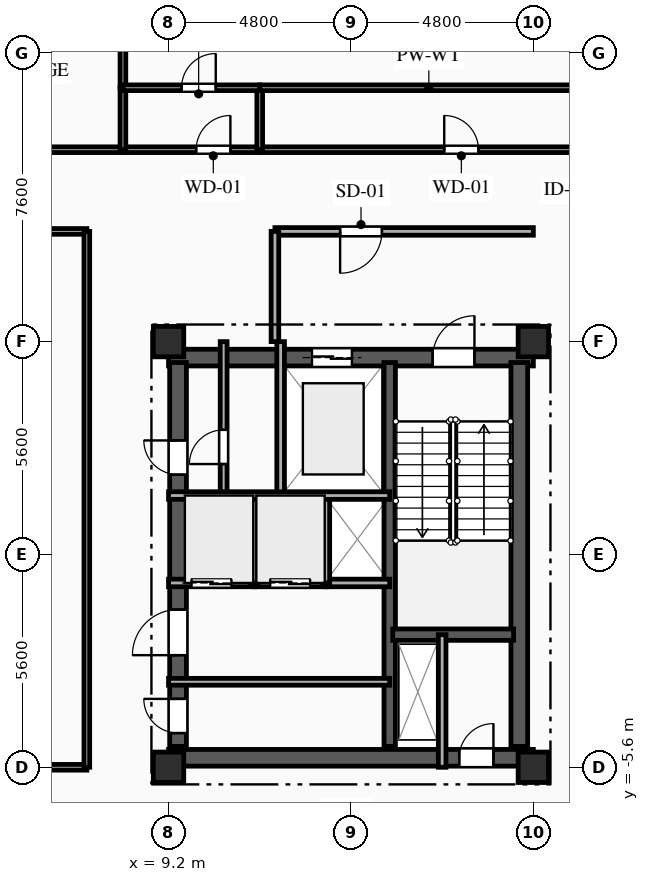
"""IFC4 building model, lengths in metres.
Left out: names, types, materials, properties, quantities, classifications, styles, units other than length and angle.
Written with IfcOpenShell. Run it as: python <this file> out.ifc"""

import sys

from ifc_helpers import new_model, si_unit, direction, frame, frame_2d, origin, origin_2d, place, context, subcontext, project, spatial, rectangle, extrude, element, fill, save


model = new_model("IFC4")
c1 = context("Model", 3, precision=1e-05, world=origin(), true_north=direction((0.0, 1.0)))
c2 = subcontext(c1, "Body", "Model", "MODEL_VIEW")
j1 = project(units=[si_unit("LENGTHUNIT", "METRE"), si_unit("PLANEANGLEUNIT", "RADIAN")], contexts=[c1])
p1 = place(None, origin())
s1 = spatial("IfcSite", under=j1, at=p1, CompositionType="ELEMENT")
p2 = place(p1, origin())
s2 = spatial("IfcBuilding", under=s1, at=p2, CompositionType="ELEMENT")
p3 = place(p2, frame((0.0, 0.0, 261.8)))
s3 = spatial("IfcBuildingStorey", under=s2, at=p3, CompositionType="ELEMENT", Elevation=261.8)
for number, where, z_axis, x_axis in (
    (1, (9.2, -5.6, 0.0), (0.0, 0.0, 1.0), (1.0, 0.0, 0.0)),
    (2, (9.2, 5.6, 0.0), (0.0, 0.0, 1.0), (1.0, 0.0, 0.0)),
    (3, (18.8, -5.6, 0.0), (0.0, 0.0, 1.0), (1.0, 0.0, 0.0)),
    (4, (18.8, 5.6, 0.0), (0.0, 0.0, 1.0), (1.0, 0.0, 0.0)),
):
    element("IfcColumn", number, at=place(p3, frame(where, z_axis=z_axis, x_axis=x_axis)), inside=s3, PredefinedType="COLUMN", context=c2, shape_type="SweptSolid", body=[
        extrude(rectangle(XDim=0.8, YDim=0.8, at=origin_2d()), origin(), (0.0, 0.0, 1.0), 4.2),
    ])
p4 = place(p3, frame((9.2, 5.18, 0.0), z_axis=(0.0, 0.0, 1.0), x_axis=(1.0, 0.0, 0.0)))
e5 = element("IfcWall", 5, at=p4, inside=s3, PredefinedType="SHEAR", context=c2, shape_type="SweptSolid", body=[
    extrude(rectangle(XDim=9.6, YDim=0.44, at=frame_2d((4.8, 0.0))), origin(), (0.0, 0.0, 1.0), 3.78),
])
p5 = place(p4, frame((6.95, 0.0, 0.0)))
e6 = element("IfcOpeningElement", 6, at=p5, cuts=e5, PredefinedType="OPENING", context=c2, shape_type="SweptSolid", body=[
    extrude(rectangle(XDim=1.1, YDim=2.15, at=frame_2d((0.55, 1.075))), frame((0.0, 0.23, 0.0), z_axis=(0.0, -1.0, 0.0), x_axis=(1.0, 0.0, 0.0)), (0.0, 0.0, 1.0), 0.46),
])
p6 = place(p4, frame((3.775, 0.0, 0.0)))
e7 = element("IfcOpeningElement", 7, at=p6, cuts=e5, PredefinedType="OPENING", context=c2, shape_type="SweptSolid", body=[
    extrude(rectangle(XDim=1.05, YDim=2.1, at=frame_2d((0.525, 1.05))), frame((0.0, 0.23, 0.0), z_axis=(0.0, -1.0, 0.0), x_axis=(1.0, 0.0, 0.0)), (0.0, 0.0, 1.0), 0.46),
])
p7 = place(p3, frame((9.2, -5.35, 0.0), z_axis=(0.0, 0.0, 1.0), x_axis=(1.0, 0.0, 0.0)))
e8 = element("IfcWall", 8, at=p7, inside=s3, PredefinedType="SHEAR", context=c2, shape_type="SweptSolid", body=[
    extrude(rectangle(XDim=9.6, YDim=0.44, at=frame_2d((4.8, 0.0))), origin(), (0.0, 0.0, 1.0), 3.78),
])
p8 = place(p7, frame((7.65, 0.0, 0.0)))
e9 = element("IfcOpeningElement", 9, at=p8, cuts=e8, PredefinedType="OPENING", context=c2, shape_type="SweptSolid", body=[
    extrude(rectangle(XDim=0.9, YDim=2.1, at=frame_2d((0.45, 1.05))), frame((0.0, 0.23, 0.0), z_axis=(0.0, -1.0, 0.0), x_axis=(1.0, 0.0, 0.0)), (0.0, 0.0, 1.0), 0.46),
])
p9 = place(p3, frame((9.45, -5.05, 0.0), z_axis=(0.0, 0.0, 1.0), x_axis=(0.0, 1.0, 0.0)))
e10 = element("IfcWall", 10, at=p9, inside=s3, PredefinedType="SHEAR", context=c2, shape_type="SweptSolid", body=[
    extrude(rectangle(XDim=10.1, YDim=0.44, at=frame_2d((5.05, 0.0))), origin(), (0.0, 0.0, 1.0), 3.78),
])
p10 = place(p9, frame((7.15, 0.0, 0.0)))
e11 = element("IfcOpeningElement", 11, at=p10, cuts=e10, PredefinedType="OPENING", context=c2, shape_type="SweptSolid", body=[
    extrude(rectangle(XDim=0.9, YDim=2.1, at=frame_2d((0.45, 1.05))), frame((0.0, 0.23, 0.0), z_axis=(0.0, -1.0, 0.0), x_axis=(1.0, 0.0, 0.0)), (0.0, 0.0, 1.0), 0.46),
])
p11 = place(p9, frame((2.4, 0.0, 0.0)))
e12 = element("IfcOpeningElement", 12, at=p11, cuts=e10, PredefinedType="OPENING", context=c2, shape_type="SweptSolid", body=[
    extrude(rectangle(XDim=1.2, YDim=2.15, at=frame_2d((0.6, 1.075))), frame((0.0, 0.23, 0.0), z_axis=(0.0, -1.0, 0.0), x_axis=(1.0, 0.0, 0.0)), (0.0, 0.0, 1.0), 0.46),
])
p12 = place(p9, frame((0.35, 0.0, 0.0)))
e13 = element("IfcOpeningElement", 13, at=p12, cuts=e10, PredefinedType="OPENING", context=c2, shape_type="SweptSolid", body=[
    extrude(rectangle(XDim=0.9, YDim=2.1, at=frame_2d((0.45, 1.05))), frame((0.0, 0.23, 0.0), z_axis=(0.0, -1.0, 0.0), x_axis=(1.0, 0.0, 0.0)), (0.0, 0.0, 1.0), 0.46),
])
p13 = place(p3, frame((18.43, -5.05, 0.0), z_axis=(0.0, 0.0, 1.0), x_axis=(0.0, 1.0, 0.0)))
e14 = element("IfcWall", 14, at=p13, inside=s3, PredefinedType="SHEAR", context=c2, shape_type="SweptSolid", body=[
    extrude(rectangle(XDim=10.1, YDim=0.44, at=frame_2d((5.05, 0.0))), origin(), (0.0, 0.0, 1.0), 3.78),
])
p14 = place(p3, frame((15.02, -5.05, 0.0), z_axis=(0.0, 0.0, 1.0), x_axis=(0.0, 1.0, 0.0)))
e15 = element("IfcWall", 15, at=p14, inside=s3, PredefinedType="SHEAR", context=c2, shape_type="SweptSolid", body=[
    extrude(rectangle(XDim=10.1, YDim=0.3, at=frame_2d((5.05, 0.0))), origin(), (0.0, 0.0, 1.0), 3.78),
])
p15 = place(p3, frame((15.1, -2.11, 0.0), z_axis=(0.0, 0.0, 1.0), x_axis=(1.0, 0.0, 0.0)))
e16 = element("IfcWall", 16, at=p15, inside=s3, PredefinedType="SHEAR", context=c2, shape_type="SweptSolid", body=[
    extrude(rectangle(XDim=3.18, YDim=0.3, at=frame_2d((1.59, 0.0))), origin(), (0.0, 0.0, 1.0), 3.78),
])
p16 = place(p3, frame((16.4, -2.11, 0.0), z_axis=(0.0, 0.0, 1.0), x_axis=(0.0, -1.0, 0.0)))
e17 = element("IfcWall", 17, at=p16, inside=s3, PredefinedType="PARTITIONING", context=c2, shape_type="SweptSolid", body=[
    extrude(rectangle(XDim=3.49, YDim=0.2, at=frame_2d((1.745, 0.0))), origin(), (0.0, 0.0, 1.0), 3.78),
])
p17 = place(p3, frame((12.15, 5.6, 0.0), z_axis=(0.0, 0.0, 1.0), x_axis=(0.0, -1.0, 0.0)))
e18 = element("IfcWall", 18, at=p17, inside=s3, PredefinedType="PARTITIONING", context=c2, shape_type="SweptSolid", body=[
    extrude(rectangle(XDim=4.05, YDim=0.2, at=frame_2d((2.025, 0.0))), origin(), (0.0, 0.0, 1.0), 3.78),
])
p18 = place(p3, frame((18.8, 8.5, 0.0), z_axis=(0.0, 0.0, 1.0), x_axis=(-1.0, 0.0, 0.0)))
e19 = element("IfcWall", 19, at=p18, inside=s3, PredefinedType="PARTITIONING", context=c2, shape_type="SweptSolid", body=[
    extrude(rectangle(XDim=6.8, YDim=0.2, at=frame_2d((3.4, 0.0))), origin(), (0.0, 0.0, 1.0), 3.78),
])
p19 = place(p18, frame((3.985, 0.0, 0.0)))
e20 = element("IfcOpeningElement", 20, at=p19, cuts=e19, PredefinedType="OPENING", context=c2, shape_type="SweptSolid", body=[
    extrude(rectangle(XDim=1.1, YDim=2.15, at=frame_2d((0.55, 1.075))), frame((0.0, 0.11, 0.0), z_axis=(0.0, -1.0, 0.0), x_axis=(1.0, 0.0, 0.0)), (0.0, 0.0, 1.0), 0.22),
])
p20 = place(p3, frame((12.0, 8.5, 0.0), z_axis=(0.0, 0.0, 1.0), x_axis=(0.0, -1.0, 0.0)))
e21 = element("IfcWall", 21, at=p20, inside=s3, PredefinedType="PARTITIONING", context=c2, shape_type="SweptSolid", body=[
    extrude(rectangle(XDim=2.9, YDim=0.2, at=frame_2d((1.45, 0.0))), origin(), (0.0, 0.0, 1.0), 3.78),
])
p21 = place(p3, frame((10.65, 1.55, 0.0), z_axis=(0.0, 0.0, 1.0), x_axis=(0.0, 1.0, 0.0)))
e22 = element("IfcWall", 22, at=p21, inside=s3, PredefinedType="PARTITIONING", context=c2, shape_type="SweptSolid", body=[
    extrude(rectangle(XDim=4.05, YDim=0.18, at=frame_2d((2.025, 0.0))), origin(), (0.0, 0.0, 1.0), 3.78),
])
p22 = place(p21, frame((0.829, 0.0, 0.0)))
e23 = element("IfcOpeningElement", 23, at=p22, cuts=e22, PredefinedType="OPENING", context=c2, shape_type="SweptSolid", body=[
    extrude(rectangle(XDim=0.9, YDim=2.1, at=frame_2d((0.45, 1.05))), frame((0.0, 0.1, 0.0), z_axis=(0.0, -1.0, 0.0), x_axis=(1.0, 0.0, 0.0)), (0.0, 0.0, 1.0), 0.2),
])
p23 = place(p3, frame((9.2, -3.35, 0.0), z_axis=(0.0, 0.0, 1.0), x_axis=(1.0, 0.0, 0.0)))
e24 = element("IfcWall", 24, at=p23, inside=s3, PredefinedType="PARTITIONING", context=c2, shape_type="SweptSolid", body=[
    extrude(rectangle(XDim=5.82, YDim=0.18, at=frame_2d((2.91, 0.0))), origin(), (0.0, 0.0, 1.0), 3.495),
])
p24 = place(p3, frame((11.46, -0.75, 0.0), z_axis=(0.0, 0.0, 1.0), x_axis=(-1.0, 0.0, 0.0)))
e25 = element("IfcWall", 25, at=p24, inside=s3, PredefinedType="PARTITIONING", context=c2, shape_type="SweptSolid", body=[
    extrude(rectangle(XDim=2.26, YDim=0.2, at=frame_2d((1.13, 0.0))), origin(), (0.0, 0.0, 1.0), 3.78),
])
p25 = place(p24, frame((0.605, 0.0, 0.0)))
e26 = element("IfcOpeningElement", 26, at=p25, cuts=e25, PredefinedType="OPENING", context=c2, shape_type="SweptSolid", body=[
    extrude(rectangle(XDim=1.05, YDim=2.1, at=frame_2d((0.525, 1.05))), frame((0.0, 0.11, 0.0), z_axis=(0.0, -1.0, 0.0), x_axis=(1.0, 0.0, 0.0)), (0.0, 0.0, 1.0), 0.22),
])
p26 = place(p3, frame((13.34, -0.75, 0.0), z_axis=(0.0, 0.0, 1.0), x_axis=(-1.0, 0.0, 0.0)))
e27 = element("IfcWall", 27, at=p26, inside=s3, PredefinedType="PARTITIONING", context=c2, shape_type="SweptSolid", body=[
    extrude(rectangle(XDim=1.88, YDim=0.2, at=frame_2d((0.94, 0.0))), origin(), (0.0, 0.0, 1.0), 3.78),
])
p27 = place(p26, frame((0.415, 0.0, 0.0)))
e28 = element("IfcOpeningElement", 28, at=p27, cuts=e27, PredefinedType="OPENING", context=c2, shape_type="SweptSolid", body=[
    extrude(rectangle(XDim=1.05, YDim=2.1, at=frame_2d((0.525, 1.05))), frame((0.0, 0.11, 0.0), z_axis=(0.0, -1.0, 0.0), x_axis=(1.0, 0.0, 0.0)), (0.0, 0.0, 1.0), 0.22),
])
p28 = place(p3, frame((15.02, -0.75, 0.0), z_axis=(0.0, 0.0, 1.0), x_axis=(-1.0, 0.0, 0.0)))
e29 = element("IfcWall", 29, at=p28, inside=s3, PredefinedType="PARTITIONING", context=c2, shape_type="SweptSolid", body=[
    extrude(rectangle(XDim=1.68, YDim=0.2, at=frame_2d((0.84, 0.0))), origin(), (0.0, 0.0, 1.0), 3.78),
])
for number, where, z_axis, x_axis in (
    (30, (11.46, -0.75, 0.0), (0.0, 0.0, 1.0), (0.0, 1.0, 0.0)),
    (31, (13.34, -0.75, 0.0), (0.0, 0.0, 1.0), (0.0, 1.0, 0.0)),
):
    element("IfcWall", number, at=place(p3, frame(where, z_axis=z_axis, x_axis=x_axis)), inside=s3, PredefinedType="PARTITIONING", context=c2, shape_type="SweptSolid", body=[
        extrude(rectangle(XDim=2.3, YDim=0.2, at=frame_2d((1.15, 0.0))), origin(), (0.0, 0.0, 1.0), 3.78),
    ])
p29 = place(p3, frame((0.0, 10.65, 0.0), z_axis=(0.0, 0.0, 1.0), x_axis=(1.0, 0.0, 0.0)))
e32 = element("IfcWall", 32, at=p29, inside=s3, PredefinedType="PARTITIONING", context=c2, shape_type="SweptSolid", body=[
    extrude(rectangle(XDim=8.0, YDim=0.15, at=frame_2d((4.0, 0.0))), origin(), (0.0, 0.0, 1.0), 3.78),
])
p30 = place(p3, frame((8.0, 10.65, 0.0), z_axis=(0.0, 0.0, 1.0), x_axis=(1.0, 0.0, 0.0)))
e33 = element("IfcWall", 33, at=p30, inside=s3, PredefinedType="PLUMBINGWALL", context=c2, shape_type="SweptSolid", body=[
    extrude(rectangle(XDim=3.6, YDim=0.15, at=frame_2d((1.8, 0.0))), origin(), (0.0, 0.0, 1.0), 3.78),
])
p31 = place(p30, frame((1.927, 0.0, 0.0)))
e34 = element("IfcOpeningElement", 34, at=p31, cuts=e33, PredefinedType="OPENING", context=c2, shape_type="SweptSolid", body=[
    extrude(rectangle(XDim=0.9, YDim=2.1, at=frame_2d((0.45, 1.05))), frame((0.0, 0.085, 0.0), z_axis=(0.0, -1.0, 0.0), x_axis=(1.0, 0.0, 0.0)), (0.0, 0.0, 1.0), 0.17),
])
p32 = place(p3, frame((11.6, 10.65, 0.0), z_axis=(0.0, 0.0, 1.0), x_axis=(1.0, 0.0, 0.0)))
e35 = element("IfcWall", 35, at=p32, inside=s3, PredefinedType="PLUMBINGWALL", context=c2, shape_type="SweptSolid", body=[
    extrude(rectangle(XDim=8.9, YDim=0.15, at=frame_2d((4.45, 0.0))), origin(), (0.0, 0.0, 1.0), 3.78),
])
p33 = place(p32, frame((4.855, 0.0, 0.0)))
e36 = element("IfcOpeningElement", 36, at=p33, cuts=e35, PredefinedType="OPENING", context=c2, shape_type="SweptSolid", body=[
    extrude(rectangle(XDim=0.9, YDim=2.1, at=frame_2d((0.45, 1.05))), frame((0.0, 0.085, 0.0), z_axis=(0.0, -1.0, 0.0), x_axis=(1.0, 0.0, 0.0)), (0.0, 0.0, 1.0), 0.17),
])
p34 = place(p3, frame((7.05, 8.5, 0.0), z_axis=(0.0, 0.0, 1.0), x_axis=(-1.0, 0.0, 0.0)))
e37 = element("IfcWall", 37, at=p34, inside=s3, PredefinedType="PARTITIONING", context=c2, shape_type="SweptSolid", body=[
    extrude(rectangle(XDim=7.05, YDim=0.15, at=frame_2d((3.525, 0.0))), origin(), (0.0, 0.0, 1.0), 3.78),
])
p35 = place(p3, frame((0.0, -5.6, 0.0), z_axis=(0.0, 0.0, 1.0), x_axis=(1.0, 0.0, 0.0)))
e38 = element("IfcWall", 38, at=p35, inside=s3, PredefinedType="PARTITIONING", context=c2, shape_type="SweptSolid", body=[
    extrude(rectangle(XDim=7.05, YDim=0.15, at=frame_2d((3.525, 0.0))), origin(), (0.0, 0.0, 1.0), 3.265),
])
p36 = place(p3, frame((7.05, -5.6, 0.0), z_axis=(0.0, 0.0, 1.0), x_axis=(0.0, 1.0, 0.0)))
e39 = element("IfcWall", 39, at=p36, inside=s3, PredefinedType="PARTITIONING", context=c2, shape_type="SweptSolid", body=[
    extrude(rectangle(XDim=14.1, YDim=0.15, at=frame_2d((7.05, 0.0))), origin(), (0.0, 0.0, 1.0), 3.78),
])
p37 = place(p3, frame((8.0, 12.28, 0.0), z_axis=(0.0, 0.0, 1.0), x_axis=(0.0, -1.0, 0.0)))
e40 = element("IfcWall", 40, at=p37, inside=s3, PredefinedType="PLUMBINGWALL", context=c2, shape_type="SweptSolid", body=[
    extrude(rectangle(XDim=1.63, YDim=0.15, at=frame_2d((0.815, 0.0))), origin(), (0.0, 0.0, 1.0), 3.78),
])
p38 = place(p3, frame((8.0, 15.2, 0.0), z_axis=(0.0, 0.0, 1.0), x_axis=(0.0, -1.0, 0.0)))
e41 = element("IfcWall", 41, at=p38, inside=s3, PredefinedType="PARTITIONING", context=c2, shape_type="SweptSolid", body=[
    extrude(rectangle(XDim=2.92, YDim=0.15, at=frame_2d((1.46, 0.0))), origin(), (0.0, 0.0, 1.0), 3.78),
])
p39 = place(p3, frame((11.6, 12.28, 0.0), z_axis=(0.0, 0.0, 1.0), x_axis=(0.0, -1.0, 0.0)))
e42 = element("IfcWall", 42, at=p39, inside=s3, PredefinedType="PLUMBINGWALL", context=c2, shape_type="SweptSolid", body=[
    extrude(rectangle(XDim=1.63, YDim=0.15, at=frame_2d((0.815, 0.0))), origin(), (0.0, 0.0, 1.0), 3.78),
])
p40 = place(p3, frame((8.0, 12.28, 0.0), z_axis=(0.0, 0.0, 1.0), x_axis=(1.0, 0.0, 0.0)))
e43 = element("IfcWall", 43, at=p40, inside=s3, PredefinedType="PLUMBINGWALL", context=c2, shape_type="SweptSolid", body=[
    extrude(rectangle(XDim=3.6, YDim=0.15, at=frame_2d((1.8, 0.0))), origin(), (0.0, 0.0, 1.0), 3.78),
])
p41 = place(p40, frame((1.542, 0.0, 0.0)))
e44 = element("IfcOpeningElement", 44, at=p41, cuts=e43, PredefinedType="OPENING", context=c2, shape_type="SweptSolid", body=[
    extrude(rectangle(XDim=0.9, YDim=2.1, at=frame_2d((0.45, 1.05))), frame((0.0, 0.085, 0.0), z_axis=(0.0, -1.0, 0.0), x_axis=(1.0, 0.0, 0.0)), (0.0, 0.0, 1.0), 0.17),
])
p42 = place(p3, frame((11.6, 12.28, 0.0), z_axis=(0.0, 0.0, 1.0), x_axis=(1.0, 0.0, 0.0)))
e45 = element("IfcWall", 45, at=p42, inside=s3, PredefinedType="PLUMBINGWALL", context=c2, shape_type="SweptSolid", body=[
    extrude(rectangle(XDim=8.9, YDim=0.15, at=frame_2d((4.45, 0.0))), origin(), (0.0, 0.0, 1.0), 3.78),
])
p43 = place(p3, frame((9.2, 1.55, 0.0), z_axis=(0.0, 0.0, 1.0), x_axis=(1.0, 0.0, 0.0)))
e46 = element("IfcWall", 46, at=p43, inside=s3, PredefinedType="PARTITIONING", context=c2, shape_type="SweptSolid", body=[
    extrude(rectangle(XDim=5.82, YDim=0.2, at=frame_2d((2.91, 0.0))), origin(), (0.0, 0.0, 1.0), 3.78),
])
p44 = place(p5, origin())
e47 = element("IfcDoor", 47, at=p44, inside=s3, OperationType="SINGLE_SWING_RIGHT", PredefinedType="DOOR", context=c2, shape_type="SweptSolid", body=[
    extrude(rectangle(XDim=1.1, YDim=2.15, at=frame_2d((0.55, 1.075))), frame((0.0, 0.025, 0.0), z_axis=(0.0, -1.0, 0.0), x_axis=(1.0, 0.0, 0.0)), (0.0, 0.0, 1.0), 0.05),
])
fill(e6, e47)
p45 = place(p6, origin())
e48 = element("IfcDoor", 48, at=p45, inside=s3, OperationType="DOUBLE_DOOR_SLIDING", PredefinedType="DOOR", context=c2, shape_type="SweptSolid", body=[
    extrude(rectangle(XDim=1.05, YDim=2.1, at=frame_2d((0.525, 1.05))), frame((0.0, 0.025, 0.0), z_axis=(0.0, -1.0, 0.0), x_axis=(1.0, 0.0, 0.0)), (0.0, 0.0, 1.0), 0.05),
])
fill(e7, e48)
p46 = place(p8, origin())
e49 = element("IfcDoor", 49, at=p46, inside=s3, OperationType="SINGLE_SWING_RIGHT", PredefinedType="DOOR", context=c2, shape_type="SweptSolid", body=[
    extrude(rectangle(XDim=0.9, YDim=2.1, at=frame_2d((0.45, 1.05))), frame((0.0, 0.025, 0.0), z_axis=(0.0, -1.0, 0.0), x_axis=(1.0, 0.0, 0.0)), (0.0, 0.0, 1.0), 0.05),
])
fill(e9, e49)
p47 = place(p19, origin())
e50 = element("IfcDoor", 50, at=p47, inside=s3, OperationType="SINGLE_SWING_RIGHT", PredefinedType="DOOR", context=c2, shape_type="SweptSolid", body=[
    extrude(rectangle(XDim=1.1, YDim=2.15, at=frame_2d((0.55, 1.075))), frame((0.0, 0.025, 0.0), z_axis=(0.0, -1.0, 0.0), x_axis=(1.0, 0.0, 0.0)), (0.0, 0.0, 1.0), 0.05),
])
fill(e20, e50)
p48 = place(p22, origin())
e51 = element("IfcDoor", 51, at=p48, inside=s3, OperationType="SINGLE_SWING_LEFT", PredefinedType="DOOR", context=c2, shape_type="SweptSolid", body=[
    extrude(rectangle(XDim=0.9, YDim=2.1, at=frame_2d((0.45, 1.05))), frame((0.0, 0.025, 0.0), z_axis=(0.0, -1.0, 0.0), x_axis=(1.0, 0.0, 0.0)), (0.0, 0.0, 1.0), 0.05),
])
fill(e23, e51)
p49 = place(p10, origin())
e52 = element("IfcDoor", 52, at=p49, inside=s3, OperationType="SINGLE_SWING_RIGHT", PredefinedType="DOOR", context=c2, shape_type="SweptSolid", body=[
    extrude(rectangle(XDim=0.9, YDim=2.1, at=frame_2d((0.45, 1.05))), frame((0.0, 0.025, 0.0), z_axis=(0.0, -1.0, 0.0), x_axis=(1.0, 0.0, 0.0)), (0.0, 0.0, 1.0), 0.05),
])
fill(e11, e52)
p50 = place(p25, origin())
e53 = element("IfcDoor", 53, at=p50, inside=s3, OperationType="DOUBLE_DOOR_SLIDING", PredefinedType="DOOR", context=c2, shape_type="SweptSolid", body=[
    extrude(rectangle(XDim=1.05, YDim=2.1, at=frame_2d((0.525, 1.05))), frame((0.0, 0.025, 0.0), z_axis=(0.0, -1.0, 0.0), x_axis=(1.0, 0.0, 0.0)), (0.0, 0.0, 1.0), 0.05),
])
fill(e26, e53)
p51 = place(p27, origin())
e54 = element("IfcDoor", 54, at=p51, inside=s3, OperationType="DOUBLE_DOOR_SLIDING", PredefinedType="DOOR", context=c2, shape_type="SweptSolid", body=[
    extrude(rectangle(XDim=1.05, YDim=2.1, at=frame_2d((0.525, 1.05))), frame((0.0, 0.025, 0.0), z_axis=(0.0, -1.0, 0.0), x_axis=(1.0, 0.0, 0.0)), (0.0, 0.0, 1.0), 0.05),
])
fill(e28, e54)
p52 = place(p11, origin())
e55 = element("IfcDoor", 55, at=p52, inside=s3, OperationType="SINGLE_SWING_LEFT", PredefinedType="DOOR", context=c2, shape_type="SweptSolid", body=[
    extrude(rectangle(XDim=1.2, YDim=2.15, at=frame_2d((0.6, 1.075))), frame((0.0, 0.025, 0.0), z_axis=(0.0, -1.0, 0.0), x_axis=(1.0, 0.0, 0.0)), (0.0, 0.0, 1.0), 0.05),
])
fill(e12, e55)
p53 = place(p12, origin())
e56 = element("IfcDoor", 56, at=p53, inside=s3, OperationType="SINGLE_SWING_RIGHT", PredefinedType="DOOR", context=c2, shape_type="SweptSolid", body=[
    extrude(rectangle(XDim=0.9, YDim=2.1, at=frame_2d((0.45, 1.05))), frame((0.0, 0.025, 0.0), z_axis=(0.0, -1.0, 0.0), x_axis=(1.0, 0.0, 0.0)), (0.0, 0.0, 1.0), 0.05),
])
fill(e13, e56)
p54 = place(p31, origin())
e57 = element("IfcDoor", 57, at=p54, inside=s3, OperationType="SINGLE_SWING_RIGHT", PredefinedType="DOOR", context=c2, shape_type="SweptSolid", body=[
    extrude(rectangle(XDim=0.9, YDim=2.1, at=frame_2d((0.45, 1.05))), frame((0.0, 0.025, 0.0), z_axis=(0.0, -1.0, 0.0), x_axis=(1.0, 0.0, 0.0)), (0.0, 0.0, 1.0), 0.05),
])
fill(e34, e57)
p55 = place(p33, origin())
e58 = element("IfcDoor", 58, at=p55, inside=s3, OperationType="SINGLE_SWING_LEFT", PredefinedType="DOOR", context=c2, shape_type="SweptSolid", body=[
    extrude(rectangle(XDim=0.9, YDim=2.1, at=frame_2d((0.45, 1.05))), frame((0.0, 0.025, 0.0), z_axis=(0.0, -1.0, 0.0), x_axis=(1.0, 0.0, 0.0)), (0.0, 0.0, 1.0), 0.05),
])
fill(e36, e58)
p56 = place(p41, origin())
e59 = element("IfcDoor", 59, at=p56, inside=s3, OperationType="SINGLE_SWING_RIGHT", PredefinedType="DOOR", context=c2, shape_type="SweptSolid", body=[
    extrude(rectangle(XDim=0.9, YDim=2.1, at=frame_2d((0.45, 1.05))), frame((0.0, 0.025, 0.0), z_axis=(0.0, -1.0, 0.0), x_axis=(1.0, 0.0, 0.0)), (0.0, 0.0, 1.0), 0.05),
])
fill(e44, e59)
save(model, sys.argv[1])
